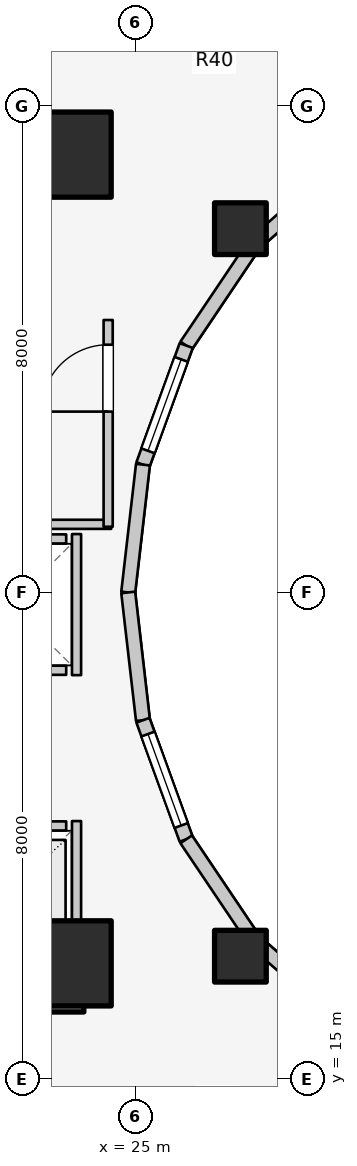
"""IFC4 building model, lengths in metres.
Left out: names, types, materials, properties, quantities, classifications, styles, units other than length and angle.
Written with IfcOpenShell. Run it as: python <this file> out.ifc"""

import sys

from ifc_helpers import new_model, si_unit, direction, frame, frame_2d, origin, origin_2d, place, context, subcontext, project, spatial, rectangle, extrude, element, fill, save


model = new_model("IFC4")
c1 = context("Model", 3, precision=1e-05, world=origin(), true_north=direction((0.0, 1.0)))
c2 = subcontext(c1, "Body", "Model", "MODEL_VIEW")
j1 = project(units=[si_unit("LENGTHUNIT", "METRE"), si_unit("PLANEANGLEUNIT", "RADIAN")], contexts=[c1])
p1 = place(None, origin())
s1 = spatial("IfcSite", under=j1, at=p1, CompositionType="ELEMENT")
p2 = place(p1, origin())
s2 = spatial("IfcBuilding", under=s1, at=p2, CompositionType="ELEMENT")
p3 = place(p2, frame((0.0, 0.0, 76.3)))
s3 = spatial("IfcBuildingStorey", under=s2, at=p3, CompositionType="ELEMENT", Elevation=76.3)
for number, where, z_axis, x_axis in (
    (1, (19.65, 16.55, 0.0), (0.0, 0.0, 1.0), (1.0, 0.0, 0.0)),
    (2, (19.65, 30.35, 0.0), (0.0, 0.0, 1.0), (1.0, 0.0, 0.0)),
):
    element("IfcWall", number, at=place(p3, frame(where, z_axis=z_axis, x_axis=x_axis)), inside=s3, PredefinedType="SHEAR", context=c2, shape_type="SweptSolid", body=[
        extrude(rectangle(XDim=4.5, YDim=0.9, at=frame_2d((2.25, 0.0))), origin(), (0.0, 0.0, 1.0), 3.1),
    ])
for number, where, z_axis, x_axis in (
    (3, (23.9, 16.9, 0.0), (0.0, 0.0, 1.0), (1.0, 0.0, 0.0)),
    (4, (23.9, 30.2, 0.0), (0.0, 0.0, 1.0), (1.0, 0.0, 0.0)),
):
    element("IfcColumn", number, at=place(p3, frame(where, z_axis=z_axis, x_axis=x_axis)), inside=s3, PredefinedType="COLUMN", context=c2, shape_type="SweptSolid", body=[
        extrude(rectangle(XDim=1.4, YDim=1.4, at=origin_2d()), origin(), (0.0, 0.0, 1.0), 3.1),
    ])
for number, where, z_axis, x_axis in (
    (5, (26.725, 28.982, 0.0), (0.0, 0.0, 1.0), (1.0, 0.0, 0.0)),
    (6, (26.725, 17.018, 0.0), (0.0, 0.0, 1.0), (1.0, 0.0, 0.0)),
):
    element("IfcColumn", number, at=place(p3, frame(where, z_axis=z_axis, x_axis=x_axis)), inside=s3, PredefinedType="COLUMN", context=c2, shape_type="SweptSolid", body=[
        extrude(rectangle(XDim=0.85, YDim=0.85, at=origin_2d()), origin(), (0.0, 0.0, 1.0), 3.1),
    ])
p4 = place(p3, frame((28.44, 30.032, 0.0), z_axis=(0.0, 0.0, 1.0), x_axis=(-0.752576694707, -0.658504607869, 0.0)))
e7 = element("IfcWall", 7, at=p4, inside=s3, PredefinedType="STANDARD", context=c2, shape_type="SweptSolid", body=[
    extrude(rectangle(XDim=1.959, YDim=0.23, at=frame_2d((0.98, 0.0))), origin(), (0.0, 0.0, 1.0), 2.16),
])
p5 = place(p3, frame((26.965, 28.742, 0.0), z_axis=(0.0, 0.0, 1.0), x_axis=(-0.558197800898, -0.829707909492, 0.0)))
e8 = element("IfcWall", 8, at=p5, inside=s3, PredefinedType="STANDARD", context=c2, shape_type="SweptSolid", body=[
    extrude(rectangle(XDim=2.027, YDim=0.23, at=frame_2d((1.013, 0.0))), origin(), (0.0, 0.0, 1.0), 2.16),
])
p6 = place(p3, frame((25.834, 27.06, 0.0), z_axis=(0.0, 0.0, 1.0), x_axis=(-0.341423187295, -0.93990968033, 0.0)))
e9 = element("IfcWall", 9, at=p6, inside=s3, PredefinedType="STANDARD", context=c2, shape_type="SweptSolid", body=[
    extrude(rectangle(XDim=2.084, YDim=0.23, at=frame_2d((1.042, 0.0))), origin(), (0.0, 0.0, 1.0), 2.84),
])
p7 = place(p6, frame((0.242, 0.0, 0.85)))
e10 = element("IfcOpeningElement", 10, at=p7, cuts=e9, PredefinedType="OPENING", context=c2, shape_type="SweptSolid", body=[
    extrude(rectangle(XDim=1.6, YDim=1.65, at=frame_2d((0.8, 0.825))), frame((0.0, 0.125, 0.0), z_axis=(0.0, -1.0, 0.0), x_axis=(1.0, 0.0, 0.0)), (0.0, 0.0, 1.0), 0.25),
])
for number, where, z_axis, x_axis in (
    (11, (25.123, 25.102, 0.0), (0.0, 0.0, 1.0), (-0.115, -0.993, 0.0)),
    (12, (24.88, 23.0, 0.0), (0.0, 0.0, 1.0), (0.115, -0.993, 0.0)),
):
    element("IfcWall", number, at=place(p3, frame(where, z_axis=z_axis, x_axis=x_axis)), inside=s3, PredefinedType="STANDARD", context=c2, shape_type="SweptSolid", body=[
        extrude(rectangle(XDim=2.115, YDim=0.23, at=frame_2d((1.058, 0.0))), origin(), (0.0, 0.0, 1.0), 2.84),
    ])
p8 = place(p3, frame((25.123, 20.898, 0.0), z_axis=(0.0, 0.0, 1.0), x_axis=(0.341423187295, -0.93990968033, 0.0)))
e13 = element("IfcWall", 13, at=p8, inside=s3, PredefinedType="STANDARD", context=c2, shape_type="SweptSolid", body=[
    extrude(rectangle(XDim=2.084, YDim=0.23, at=frame_2d((1.042, 0.0))), origin(), (0.0, 0.0, 1.0), 2.84),
])
p9 = place(p8, frame((0.242, 0.0, 0.85)))
e14 = element("IfcOpeningElement", 14, at=p9, cuts=e13, PredefinedType="OPENING", context=c2, shape_type="SweptSolid", body=[
    extrude(rectangle(XDim=1.6, YDim=1.65, at=frame_2d((0.8, 0.825))), frame((0.0, 0.125, 0.0), z_axis=(0.0, -1.0, 0.0), x_axis=(1.0, 0.0, 0.0)), (0.0, 0.0, 1.0), 0.25),
])
p10 = place(p3, frame((25.834, 18.94, 0.0), z_axis=(0.0, 0.0, 1.0), x_axis=(0.558197800898, -0.829707909492, 0.0)))
e15 = element("IfcWall", 15, at=p10, inside=s3, PredefinedType="STANDARD", context=c2, shape_type="SweptSolid", body=[
    extrude(rectangle(XDim=2.027, YDim=0.23, at=frame_2d((1.013, 0.0))), origin(), (0.0, 0.0, 1.0), 2.16),
])
p11 = place(p3, frame((26.965, 17.258, 0.0), z_axis=(0.0, 0.0, 1.0), x_axis=(0.752576694707, -0.658504607869, 0.0)))
e16 = element("IfcWall", 16, at=p11, inside=s3, PredefinedType="STANDARD", context=c2, shape_type="SweptSolid", body=[
    extrude(rectangle(XDim=1.959, YDim=0.23, at=frame_2d((0.98, 0.0))), origin(), (0.0, 0.0, 1.0), 2.16),
])
p12 = place(p3, frame((22.04, 19.16, 0.0), z_axis=(0.0, 0.0, 1.0), x_axis=(1.0, 0.0, 0.0)))
e17 = element("IfcWall", 17, at=p12, inside=s3, PredefinedType="SOLIDWALL", context=c2, shape_type="SweptSolid", body=[
    extrude(rectangle(XDim=1.82, YDim=0.15, at=frame_2d((0.91, 0.0))), origin(), (0.0, 0.0, 1.0), 2.12),
])
p13 = place(p12, frame((0.36, 0.0, 0.0)))
e18 = element("IfcOpeningElement", 18, at=p13, cuts=e17, PredefinedType="OPENING", context=c2, shape_type="SweptSolid", body=[
    extrude(rectangle(XDim=1.1, YDim=2.1, at=frame_2d((0.55, 1.05))), frame((0.0, 0.085, 0.0), z_axis=(0.0, -1.0, 0.0), x_axis=(1.0, 0.0, 0.0)), (0.0, 0.0, 1.0), 0.17),
])
p14 = place(p3, frame((22.04, 17.1, 0.0), z_axis=(0.0, 0.0, 1.0), x_axis=(1.0, 0.0, 0.0)))
e19 = element("IfcWall", 19, at=p14, inside=s3, PredefinedType="SOLIDWALL", context=c2, shape_type="SweptSolid", body=[
    extrude(rectangle(XDim=1.82, YDim=0.15, at=frame_2d((0.91, 0.0))), origin(), (0.0, 0.0, 1.0), 2.12),
])
p15 = place(p3, frame((24.03, 17.02, 0.0), z_axis=(0.0, 0.0, 1.0), x_axis=(0.0, 1.0, 0.0)))
e20 = element("IfcWall", 20, at=p15, inside=s3, PredefinedType="SOLIDWALL", context=c2, shape_type="SweptSolid", body=[
    extrude(rectangle(XDim=2.22, YDim=0.15, at=frame_2d((1.11, 0.0))), origin(), (0.0, 0.0, 1.0), 2.12),
])
for number, where, z_axis, x_axis in (
    (21, (22.04, 21.72, 0.0), (0.0, 0.0, 1.0), (1.0, 0.0, 0.0)),
    (22, (22.04, 23.88, 0.0), (0.0, 0.0, 1.0), (1.0, 0.0, 0.0)),
):
    element("IfcWall", number, at=place(p3, frame(where, z_axis=z_axis, x_axis=x_axis)), inside=s3, PredefinedType="SOLIDWALL", context=c2, shape_type="SweptSolid", body=[
        extrude(rectangle(XDim=1.82, YDim=0.15, at=frame_2d((0.91, 0.0))), origin(), (0.0, 0.0, 1.0), 2.12),
    ])
p16 = place(p3, frame((24.03, 21.64, 0.0), z_axis=(0.0, 0.0, 1.0), x_axis=(0.0, 1.0, 0.0)))
e23 = element("IfcWall", 23, at=p16, inside=s3, PredefinedType="SOLIDWALL", context=c2, shape_type="SweptSolid", body=[
    extrude(rectangle(XDim=2.32, YDim=0.15, at=frame_2d((1.16, 0.0))), origin(), (0.0, 0.0, 1.0), 2.12),
])
p17 = place(p3, frame((19.52, 24.12, 0.0), z_axis=(0.0, 0.0, 1.0), x_axis=(1.0, 0.0, 0.0)))
e24 = element("IfcWall", 24, at=p17, inside=s3, PredefinedType="PARTITIONING", context=c2, shape_type="SweptSolid", body=[
    extrude(rectangle(XDim=5.08, YDim=0.15, at=frame_2d((2.54, 0.0))), origin(), (0.0, 0.0, 1.0), 2.12),
])
p18 = place(p3, frame((24.55, 24.08, 0.0), z_axis=(0.0, 0.0, 1.0), x_axis=(0.0, 1.0, 0.0)))
e25 = element("IfcWall", 25, at=p18, inside=s3, PredefinedType="PARTITIONING", context=c2, shape_type="SweptSolid", body=[
    extrude(rectangle(XDim=3.4, YDim=0.15, at=frame_2d((1.7, 0.0))), origin(), (0.0, 0.0, 1.0), 2.855),
])
p19 = place(p18, frame((1.894, 0.0, 0.0)))
e26 = element("IfcOpeningElement", 26, at=p19, cuts=e25, PredefinedType="OPENING", context=c2, shape_type="SweptSolid", body=[
    extrude(rectangle(XDim=1.1, YDim=2.1, at=frame_2d((0.55, 1.05))), frame((0.0, 0.085, 0.0), z_axis=(0.0, -1.0, 0.0), x_axis=(1.0, 0.0, 0.0)), (0.0, 0.0, 1.0), 0.17),
])
p20 = place(p7, origin())
e27 = element("IfcWindow", 27, at=p20, inside=s3, PartitioningType="SINGLE_PANEL", PredefinedType="WINDOW", context=c2, shape_type="SweptSolid", body=[
    extrude(rectangle(XDim=1.6, YDim=1.65, at=frame_2d((0.8, 0.825))), frame((0.0, 0.03, 0.0), z_axis=(0.0, -1.0, 0.0), x_axis=(1.0, 0.0, 0.0)), (0.0, 0.0, 1.0), 0.06),
])
fill(e10, e27)
p21 = place(p9, origin())
e28 = element("IfcWindow", 28, at=p21, inside=s3, PartitioningType="SINGLE_PANEL", PredefinedType="WINDOW", context=c2, shape_type="SweptSolid", body=[
    extrude(rectangle(XDim=1.6, YDim=1.65, at=frame_2d((0.8, 0.825))), frame((0.0, 0.03, 0.0), z_axis=(0.0, -1.0, 0.0), x_axis=(1.0, 0.0, 0.0)), (0.0, 0.0, 1.0), 0.06),
])
fill(e14, e28)
p22 = place(p19, origin())
e29 = element("IfcDoor", 29, at=p22, inside=s3, OperationType="SINGLE_SWING_LEFT", PredefinedType="DOOR", context=c2, shape_type="SweptSolid", body=[
    extrude(rectangle(XDim=1.1, YDim=2.1, at=frame_2d((0.55, 1.05))), frame((0.0, 0.025, 0.0), z_axis=(0.0, -1.0, 0.0), x_axis=(1.0, 0.0, 0.0)), (0.0, 0.0, 1.0), 0.05),
])
fill(e26, e29)
save(model, sys.argv[1])
